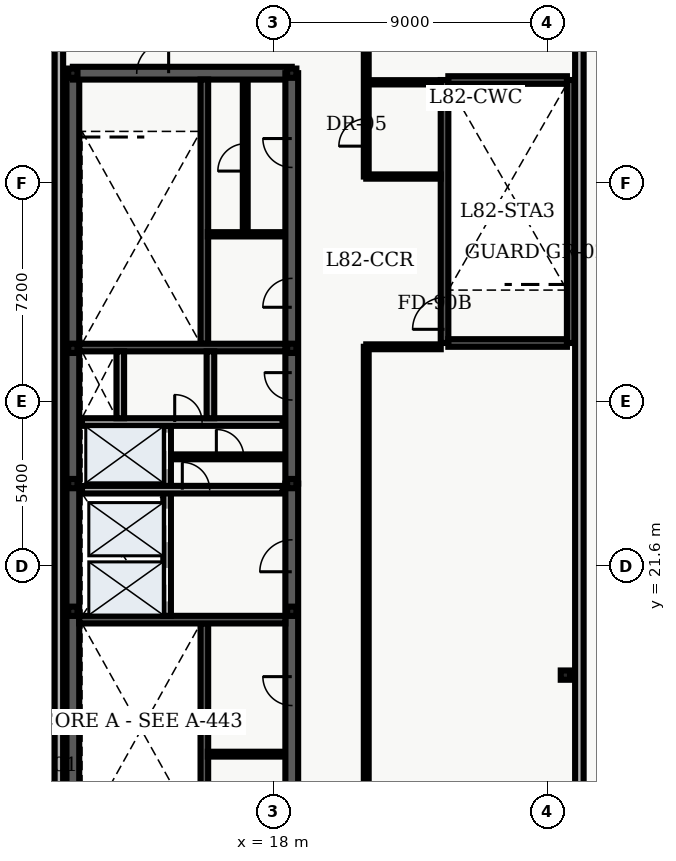
"""IFC4 building model, lengths in metres.
Left out: names, types, materials, properties, quantities, classifications, styles, units other than length and angle.
Written with IfcOpenShell. Run it as: python <this file> out.ifc"""

import sys

from ifc_helpers import new_model, entity, si_unit, converted_unit, direction, frame, origin_with_axes, origin_2d_with_axis, place, context, subcontext, project, spatial, polyline, rectangle, hollow_rectangle, outline, extrude, element, fill, save


model = new_model("IFC4")
c1 = context("Model", 3, precision=1e-05, world=origin_with_axes(), true_north=direction((0.0, 1.0)))
c2 = subcontext(c1, "Body", "Model", "MODEL_VIEW")
j1 = project(units=[si_unit("LENGTHUNIT", "METRE"), converted_unit("PLANEANGLEUNIT", "DEGREE", entity("IfcPlaneAngleMeasure", 0.017), si_unit("PLANEANGLEUNIT", "RADIAN"), dimensions=[0, 0, 0, 0, 0, 0, 0])], contexts=[c1])
p1 = place(None, origin_with_axes())
s1 = spatial("IfcSite", under=j1, at=p1, CompositionType="ELEMENT")
p2 = place(p1, origin_with_axes())
s2 = spatial("IfcBuilding", under=s1, at=p2, CompositionType="ELEMENT")
p3 = place(p2, frame((0.0, 0.0, 332.1), z_axis=(0.0, 0.0, 1.0), x_axis=(1.0, 0.0, 0.0)))
s3 = spatial("IfcBuildingStorey", under=s2, at=p3, CompositionType="ELEMENT", Elevation=332.1)
p4 = place(p3, frame((11.4, 10.8, 0.0), z_axis=(0.0, 0.0, 1.0), x_axis=(0.0, 1.0, 0.0)))
e1 = element("IfcWall", 1, at=p4, inside=s3, PredefinedType="SHEAR", context=c2, shape_type="SweptSolid", body=[
    extrude(outline(polyline([(0.0, -0.21), (27.0, -0.21), (27.0, 0.21), (0.0, 0.21), (0.0, -0.21)])), origin_with_axes(), (0.0, 0.0, 1.0), 3.64),
])
p5 = place(p3, frame((11.4, 37.8, 0.0), z_axis=(0.0, 0.0, 1.0), x_axis=(1.0, 0.0, 0.0)))
e2 = element("IfcWall", 2, at=p5, inside=s3, PredefinedType="SHEAR", context=c2, shape_type="SweptSolid", body=[
    extrude(outline(polyline([(0.0, -0.21), (7.2, -0.21), (7.2, 0.21), (0.0, 0.21), (0.0, -0.21)])), origin_with_axes(), (0.0, 0.0, 1.0), 3.64),
])
p6 = place(p5, frame((2.625, 0.0, 0.0), z_axis=(0.0, 0.0, 1.0), x_axis=(1.0, 0.0, 0.0)))
e3 = element("IfcOpeningElement", 3, at=p6, cuts=e2, PredefinedType="OPENING", context=c2, shape_type="SweptSolid", body=[
    extrude(rectangle(XDim=1.05, YDim=0.44, at=origin_2d_with_axis()), origin_with_axes(), (0.0, 0.0, 1.0), 2.15),
])
p7 = place(p3, frame((18.6, 10.8, 0.0), z_axis=(0.0, 0.0, 1.0), x_axis=(0.0, 1.0, 0.0)))
e4 = element("IfcWall", 4, at=p7, inside=s3, PredefinedType="SHEAR", context=c2, shape_type="SweptSolid", body=[
    extrude(outline(polyline([(0.0, -0.21), (13.5, -0.21), (13.5, 0.21), (0.0, 0.21), (0.0, -0.21)])), origin_with_axes(), (0.0, 0.0, 1.0), 3.64),
])
p8 = place(p7, frame((11.125, 0.0, 0.0), z_axis=(0.0, 0.0, 1.0), x_axis=(1.0, 0.0, 0.0)))
e5 = element("IfcOpeningElement", 5, at=p8, cuts=e4, PredefinedType="OPENING", context=c2, shape_type="SweptSolid", body=[
    extrude(rectangle(XDim=1.05, YDim=0.44, at=origin_2d_with_axis()), origin_with_axes(), (0.0, 0.0, 1.0), 2.15),
])
p9 = place(p7, frame((2.375, 0.0, 0.0), z_axis=(0.0, 0.0, 1.0), x_axis=(1.0, 0.0, 0.0)))
e6 = element("IfcOpeningElement", 6, at=p9, cuts=e4, PredefinedType="OPENING", context=c2, shape_type="SweptSolid", body=[
    extrude(rectangle(XDim=0.95, YDim=0.44, at=origin_2d_with_axis()), origin_with_axes(), (0.0, 0.0, 1.0), 2.15),
])
p10 = place(p7, frame((6.675, 0.0, 0.0), z_axis=(0.0, 0.0, 1.0), x_axis=(1.0, 0.0, 0.0)))
e7 = element("IfcOpeningElement", 7, at=p10, cuts=e4, PredefinedType="OPENING", context=c2, shape_type="SweptSolid", body=[
    extrude(rectangle(XDim=0.95, YDim=0.44, at=origin_2d_with_axis()), origin_with_axes(), (0.0, 0.0, 1.0), 2.15),
])
p11 = place(p3, frame((18.6, 24.3, 0.0), z_axis=(0.0, 0.0, 1.0), x_axis=(0.0, 1.0, 0.0)))
e8 = element("IfcWall", 8, at=p11, inside=s3, PredefinedType="SHEAR", context=c2, shape_type="SweptSolid", body=[
    extrude(outline(polyline([(0.0, -0.21), (13.5, -0.21), (13.5, 0.21), (0.0, 0.21), (0.0, -0.21)])), origin_with_axes(), (0.0, 0.0, 1.0), 3.64),
])
p12 = place(p11, frame((3.2, 0.0, 0.0), z_axis=(0.0, 0.0, 1.0), x_axis=(1.0, 0.0, 0.0)))
e9 = element("IfcOpeningElement", 9, at=p12, cuts=e8, PredefinedType="OPENING", context=c2, shape_type="SweptSolid", body=[
    extrude(rectangle(XDim=0.9, YDim=0.44, at=origin_2d_with_axis()), origin_with_axes(), (0.0, 0.0, 1.0), 2.15),
])
p13 = place(p11, frame((6.275, 0.0, 0.0), z_axis=(0.0, 0.0, 1.0), x_axis=(1.0, 0.0, 0.0)))
e10 = element("IfcOpeningElement", 10, at=p13, cuts=e8, PredefinedType="OPENING", context=c2, shape_type="SweptSolid", body=[
    extrude(rectangle(XDim=0.95, YDim=0.44, at=origin_2d_with_axis()), origin_with_axes(), (0.0, 0.0, 1.0), 2.15),
])
p14 = place(p11, frame((10.875, 0.0, 0.0), z_axis=(0.0, 0.0, 1.0), x_axis=(1.0, 0.0, 0.0)))
e11 = element("IfcOpeningElement", 11, at=p14, cuts=e8, PredefinedType="OPENING", context=c2, shape_type="SweptSolid", body=[
    extrude(rectangle(XDim=0.95, YDim=0.44, at=origin_2d_with_axis()), origin_with_axes(), (0.0, 0.0, 1.0), 2.15),
])
p15 = place(p3, frame((15.725, 11.01, 0.0), z_axis=(0.0, 0.0, 1.0), x_axis=(0.0, 1.0, 0.0)))
e12 = element("IfcWall", 12, at=p15, inside=s3, PredefinedType="SHEAR", context=c2, shape_type="SweptSolid", body=[
    extrude(outline(polyline([(0.0, -0.125), (8.69, -0.125), (8.69, 0.125), (0.0, 0.125), (0.0, -0.125)])), origin_with_axes(), (0.0, 0.0, 1.0), 3.64),
])
p16 = place(p3, frame((11.61, 19.825, 0.0), z_axis=(0.0, 0.0, 1.0), x_axis=(1.0, 0.0, 0.0)))
e13 = element("IfcWall", 13, at=p16, inside=s3, PredefinedType="SHEAR", context=c2, shape_type="SweptSolid", body=[
    extrude(outline(polyline([(0.0, -0.125), (6.78, -0.125), (6.78, 0.125), (0.0, 0.125), (0.0, -0.125)])), origin_with_axes(), (0.0, 0.0, 1.0), 3.64),
])
p17 = place(p3, frame((15.725, 28.9, 0.0), z_axis=(0.0, 0.0, 1.0), x_axis=(0.0, 1.0, 0.0)))
e14 = element("IfcWall", 14, at=p17, inside=s3, PredefinedType="SHEAR", context=c2, shape_type="SweptSolid", body=[
    extrude(outline(polyline([(0.0, -0.125), (8.69, -0.125), (8.69, 0.125), (0.0, 0.125), (0.0, -0.125)])), origin_with_axes(), (0.0, 0.0, 1.0), 3.64),
])
p18 = place(p3, frame((11.61, 28.775, 0.0), z_axis=(0.0, 0.0, 1.0), x_axis=(1.0, 0.0, 0.0)))
e15 = element("IfcWall", 15, at=p18, inside=s3, PredefinedType="SHEAR", context=c2, shape_type="SweptSolid", body=[
    extrude(outline(polyline([(0.0, -0.125), (6.78, -0.125), (6.78, 0.125), (0.0, 0.125), (0.0, -0.125)])), origin_with_axes(), (0.0, 0.0, 1.0), 3.64),
])
p19 = place(p3, frame((14.5, 19.95, 0.0), z_axis=(0.0, 0.0, 1.0), x_axis=(0.0, 1.0, 0.0)))
e16 = element("IfcWall", 16, at=p19, inside=s3, PredefinedType="SOLIDWALL", context=c2, shape_type="SweptSolid", body=[
    extrude(outline(polyline([(0.0, -0.125), (6.25, -0.125), (6.25, 0.125), (0.0, 0.125), (0.0, -0.125)])), origin_with_axes(), (0.0, 0.0, 1.0), 2.68),
])
p20 = place(p19, frame((1.025, 0.0, 0.0), z_axis=(0.0, 0.0, 1.0), x_axis=(1.0, 0.0, 0.0)))
e17 = element("IfcOpeningElement", 17, at=p20, cuts=e16, PredefinedType="OPENING", context=c2, shape_type="SweptSolid", body=[
    extrude(rectangle(XDim=1.1, YDim=0.27, at=origin_2d_with_axis()), origin_with_axes(), (0.0, 0.0, 1.0), 2.15),
])
p21 = place(p19, frame((2.975, 0.0, 0.0), z_axis=(0.0, 0.0, 1.0), x_axis=(1.0, 0.0, 0.0)))
e18 = element("IfcOpeningElement", 18, at=p21, cuts=e16, PredefinedType="OPENING", context=c2, shape_type="SweptSolid", body=[
    extrude(rectangle(XDim=1.1, YDim=0.27, at=origin_2d_with_axis()), origin_with_axes(), (0.0, 0.0, 1.0), 2.15),
])
p22 = place(p19, frame((5.425, 0.0, 0.0), z_axis=(0.0, 0.0, 1.0), x_axis=(1.0, 0.0, 0.0)))
e19 = element("IfcOpeningElement", 19, at=p22, cuts=e16, PredefinedType="OPENING", context=c2, shape_type="SweptSolid", body=[
    extrude(rectangle(XDim=1.2, YDim=0.27, at=origin_2d_with_axis()), origin_with_axes(), (0.0, 0.0, 1.0), 2.15),
])
p23 = place(p3, frame((11.7, 24.1, 0.0), z_axis=(0.0, 0.0, 1.0), x_axis=(1.0, 0.0, 0.0)))
e20 = element("IfcWall", 20, at=p23, inside=s3, PredefinedType="SOLIDWALL", context=c2, shape_type="SweptSolid", body=[
    extrude(outline(polyline([(0.0, -0.125), (6.6, -0.125), (6.6, 0.125), (0.0, 0.125), (0.0, -0.125)])), origin_with_axes(), (0.0, 0.0, 1.0), 2.68),
])
p24 = place(p23, frame((3.75, 0.0, 0.0), z_axis=(0.0, 0.0, 1.0), x_axis=(1.0, 0.0, 0.0)))
e21 = element("IfcOpeningElement", 21, at=p24, cuts=e20, PredefinedType="OPENING", context=c2, shape_type="SweptSolid", body=[
    extrude(rectangle(XDim=0.9, YDim=0.27, at=origin_2d_with_axis()), origin_with_axes(), (0.0, 0.0, 1.0), 2.15),
])
p25 = place(p3, frame((11.7, 26.325, 0.0), z_axis=(0.0, 0.0, 1.0), x_axis=(1.0, 0.0, 0.0)))
e22 = element("IfcWall", 22, at=p25, inside=s3, PredefinedType="SOLIDWALL", context=c2, shape_type="SweptSolid", body=[
    extrude(outline(polyline([(0.0, -0.125), (6.6, -0.125), (6.6, 0.125), (0.0, 0.125), (0.0, -0.125)])), origin_with_axes(), (0.0, 0.0, 1.0), 2.68),
])
p26 = place(p25, frame((3.5, 0.0, 0.0), z_axis=(0.0, 0.0, 1.0), x_axis=(1.0, 0.0, 0.0)))
e23 = element("IfcOpeningElement", 23, at=p26, cuts=e22, PredefinedType="OPENING", context=c2, shape_type="SweptSolid", body=[
    extrude(rectangle(XDim=0.9, YDim=0.27, at=origin_2d_with_axis()), origin_with_axes(), (0.0, 0.0, 1.0), 2.15),
])
for number, where, z_axis, x_axis in (
    (24, (12.96, 26.45, 0.0), (0.0, 0.0, 1.0), (0.0, 1.0, 0.0)),
    (25, (15.925, 26.45, 0.0), (0.0, 0.0, 1.0), (0.0, 1.0, 0.0)),
):
    element("IfcWall", number, at=place(p3, frame(where, z_axis=z_axis, x_axis=x_axis)), inside=s3, PredefinedType="SOLIDWALL", context=c2, shape_type="SweptSolid", body=[
        extrude(outline(polyline([(0.0, -0.125), (2.2, -0.125), (2.2, 0.125), (0.0, 0.125), (0.0, -0.125)])), origin_with_axes(), (0.0, 0.0, 1.0), 2.68),
    ])
p27 = place(p3, frame((23.625, 28.925, 0.0), z_axis=(0.0, 0.0, 1.0), x_axis=(0.0, 1.0, 0.0)))
e26 = element("IfcWall", 26, at=p27, inside=s3, PredefinedType="SHEAR", context=c2, shape_type="SweptSolid", body=[
    extrude(outline(polyline([(0.0, -0.125), (8.65, -0.125), (8.65, 0.125), (0.0, 0.125), (0.0, -0.125)])), origin_with_axes(), (0.0, 0.0, 1.0), 3.64),
])
p28 = place(p27, frame((0.975, 0.0, 0.0), z_axis=(0.0, 0.0, 1.0), x_axis=(1.0, 0.0, 0.0)))
e27 = element("IfcOpeningElement", 27, at=p28, cuts=e26, PredefinedType="OPENING", context=c2, shape_type="SweptSolid", body=[
    extrude(rectangle(XDim=1.05, YDim=0.27, at=origin_2d_with_axis()), origin_with_axes(), (0.0, 0.0, 1.0), 2.15),
])
p29 = place(p3, frame((27.775, 28.925, 0.0), z_axis=(0.0, 0.0, 1.0), x_axis=(0.0, 1.0, 0.0)))
e28 = element("IfcWall", 28, at=p29, inside=s3, PredefinedType="SHEAR", context=c2, shape_type="SweptSolid", body=[
    extrude(outline(polyline([(0.0, -0.125), (8.65, -0.125), (8.65, 0.125), (0.0, 0.125), (0.0, -0.125)])), origin_with_axes(), (0.0, 0.0, 1.0), 3.64),
])
for number, where, z_axis, x_axis in (
    (29, (23.75, 28.925, 0.0), (0.0, 0.0, 1.0), (1.0, 0.0, 0.0)),
    (30, (23.75, 37.575, 0.0), (0.0, 0.0, 1.0), (1.0, 0.0, 0.0)),
):
    element("IfcWall", number, at=place(p3, frame(where, z_axis=z_axis, x_axis=x_axis)), inside=s3, PredefinedType="SHEAR", context=c2, shape_type="SweptSolid", body=[
        extrude(outline(polyline([(0.0, -0.125), (3.9, -0.125), (3.9, 0.125), (0.0, 0.125), (0.0, -0.125)])), origin_with_axes(), (0.0, 0.0, 1.0), 3.64),
    ])
for number, where, z_axis, x_axis in (
    (31, (11.4, 20.1, 0.0), (0.0, 0.0, 1.0), (1.0, 0.0, 0.0)),
    (32, (11.4, 24.3, 0.0), (0.0, 0.0, 1.0), (1.0, 0.0, 0.0)),
    (33, (11.4, 28.75, 0.0), (0.0, 0.0, 1.0), (1.0, 0.0, 0.0)),
    (34, (11.4, 37.8, 0.0), (0.0, 0.0, 1.0), (1.0, 0.0, 0.0)),
    (35, (18.6, 20.1, 0.0), (0.0, 0.0, 1.0), (1.0, 0.0, 0.0)),
    (36, (18.6, 24.3, 0.0), (0.0, 0.0, 1.0), (1.0, 0.0, 0.0)),
    (37, (18.6, 28.75, 0.0), (0.0, 0.0, 1.0), (1.0, 0.0, 0.0)),
    (38, (18.6, 37.8, 0.0), (0.0, 0.0, 1.0), (1.0, 0.0, 0.0)),
    (39, (27.6, 18.0, 0.0), (0.0, 0.0, 1.0), (1.0, 0.0, 0.0)),
):
    element("IfcColumn", number, at=place(p3, frame(where, z_axis=z_axis, x_axis=x_axis)), inside=s3, PredefinedType="COLUMN", context=c2, shape_type="SweptSolid", body=[
        extrude(hollow_rectangle(XDim=0.305, YDim=0.305, WallThickness=0.015, InnerFilletRadius=0.015, OuterFilletRadius=0.03, at=origin_2d_with_axis()), origin_with_axes(), (0.0, 0.0, 1.0), 3.783),
    ])
p30 = place(p3, frame((14.62, 25.18, 0.0), z_axis=(0.0, 0.0, 1.0), x_axis=(1.0, 0.0, 0.0)))
e40 = element("IfcWall", 40, at=p30, inside=s3, PredefinedType="PARTITIONING", context=c2, shape_type="SweptSolid", body=[
    extrude(outline(polyline([(0.0, -0.08), (3.68, -0.08), (3.68, 0.08), (0.0, 0.08), (0.0, -0.08)])), origin_with_axes(), (0.0, 0.0, 1.0), 2.68),
])
p31 = place(p30, frame((1.95, 0.0, 0.0), z_axis=(0.0, 0.0, 1.0), x_axis=(1.0, 0.0, 0.0)))
e41 = element("IfcOpeningElement", 41, at=p31, cuts=e40, PredefinedType="OPENING", context=c2, shape_type="SweptSolid", body=[
    extrude(rectangle(XDim=0.9, YDim=0.18, at=origin_2d_with_axis()), origin_with_axes(), (0.0, 0.0, 1.0), 2.15),
])
p32 = place(p3, frame((15.84, 15.4, 0.0), z_axis=(0.0, 0.0, 1.0), x_axis=(1.0, 0.0, 0.0)))
e42 = element("IfcWall", 42, at=p32, inside=s3, PredefinedType="PARTITIONING", context=c2, shape_type="SweptSolid", body=[
    extrude(outline(polyline([(0.0, -0.08), (2.46, -0.08), (2.46, 0.08), (0.0, 0.08), (0.0, -0.08)])), origin_with_axes(), (0.0, 0.0, 1.0), 2.68),
])
p33 = place(p3, frame((15.84, 32.5, 0.0), z_axis=(0.0, 0.0, 1.0), x_axis=(1.0, 0.0, 0.0)))
e43 = element("IfcWall", 43, at=p33, inside=s3, PredefinedType="PARTITIONING", context=c2, shape_type="SweptSolid", body=[
    extrude(outline(polyline([(0.0, -0.07), (2.46, -0.07), (2.46, 0.07), (0.0, 0.07), (0.0, -0.07)])), origin_with_axes(), (0.0, 0.0, 1.0), 2.68),
])
p34 = place(p3, frame((17.07, 32.58, 0.0), z_axis=(0.0, 0.0, 1.0), x_axis=(0.0, 1.0, 0.0)))
e44 = element("IfcWall", 44, at=p34, inside=s3, PredefinedType="PARTITIONING", context=c2, shape_type="SweptSolid", body=[
    extrude(outline(polyline([(0.0, -0.08), (4.92, -0.08), (4.92, 0.08), (0.0, 0.08), (0.0, -0.08)])), origin_with_axes(), (0.0, 0.0, 1.0), 2.68),
])
p35 = place(p34, frame((2.45, 0.0, 0.0), z_axis=(0.0, 0.0, 1.0), x_axis=(1.0, 0.0, 0.0)))
e45 = element("IfcOpeningElement", 45, at=p35, cuts=e44, PredefinedType="OPENING", context=c2, shape_type="SweptSolid", body=[
    extrude(rectangle(XDim=0.9, YDim=0.18, at=origin_2d_with_axis()), origin_with_axes(), (0.0, 0.0, 1.0), 2.15),
])
for number, where, z_axis, x_axis in (
    (46, (21.05, 34.4, 0.0), (0.0, 0.0, 1.0), (1.0, 0.0, 0.0)),
    (47, (21.05, 37.5, 0.0), (0.0, 0.0, 1.0), (1.0, 0.0, 0.0)),
):
    element("IfcWall", number, at=place(p3, frame(where, z_axis=z_axis, x_axis=x_axis)), inside=s3, PredefinedType="PARTITIONING", context=c2, shape_type="SweptSolid", body=[
        extrude(outline(polyline([(0.0, -0.07), (2.45, -0.07), (2.45, 0.07), (0.0, 0.07), (0.0, -0.07)])), origin_with_axes(), (0.0, 0.0, 1.0), 2.68),
    ])
p36 = place(p3, frame((21.05, 7.495, 0.0), z_axis=(0.0, 0.0, 1.0), x_axis=(0.0, 1.0, 0.0)))
e48 = element("IfcWall", 48, at=p36, inside=s3, PredefinedType="PARTITIONING", context=c2, shape_type="SweptSolid", body=[
    extrude(outline(polyline([(0.0, -0.08), (21.305, -0.08), (21.305, 0.08), (0.0, 0.08), (0.0, -0.08)])), origin_with_axes(), (0.0, 0.0, 1.0), 2.68),
])
p37 = place(p36, frame((4.78, 0.0, 0.0), z_axis=(0.0, 0.0, 1.0), x_axis=(1.0, 0.0, 0.0)))
e49 = element("IfcOpeningElement", 49, at=p37, cuts=e48, PredefinedType="OPENING", context=c2, shape_type="SweptSolid", body=[
    extrude(rectangle(XDim=1.05, YDim=0.18, at=origin_2d_with_axis()), origin_with_axes(), (0.0, 0.0, 1.0), 2.15),
])
p38 = place(p3, frame((21.05, 34.4, 0.0), z_axis=(0.0, 0.0, 1.0), x_axis=(0.0, 1.0, 0.0)))
e50 = element("IfcWall", 50, at=p38, inside=s3, PredefinedType="PARTITIONING", context=c2, shape_type="SweptSolid", body=[
    extrude(outline(polyline([(0.0, -0.08), (6.705, -0.08), (6.705, 0.08), (0.0, 0.08), (0.0, -0.08)])), origin_with_axes(), (0.0, 0.0, 1.0), 2.68),
])
p39 = place(p38, frame((1.45, 0.0, 0.0), z_axis=(0.0, 0.0, 1.0), x_axis=(1.0, 0.0, 0.0)))
e51 = element("IfcOpeningElement", 51, at=p39, cuts=e50, PredefinedType="OPENING", context=c2, shape_type="SweptSolid", body=[
    extrude(rectangle(XDim=0.9, YDim=0.18, at=origin_2d_with_axis()), origin_with_axes(), (0.0, 0.0, 1.0), 2.15),
])
p40 = place(p3, frame((21.05, 28.8, 0.0), z_axis=(0.0, 0.0, 1.0), x_axis=(1.0, 0.0, 0.0)))
e52 = element("IfcWall", 52, at=p40, inside=s3, PredefinedType="PARTITIONING", context=c2, shape_type="SweptSolid", body=[
    extrude(outline(polyline([(0.0, -0.08), (2.45, -0.08), (2.45, 0.08), (0.0, 0.08), (0.0, -0.08)])), origin_with_axes(), (0.0, 0.0, 1.0), 2.68),
])
p41 = place(p3, frame((10.75, 7.5, 0.0), z_axis=(0.0, 0.0, 1.0), x_axis=(0.0, 1.0, 0.0)))
e53 = element("IfcWall", 53, at=p41, inside=s3, PredefinedType="SOLIDWALL", context=c2, shape_type="SweptSolid", body=[
    extrude(outline(polyline([(0.0, -0.15), (33.9, -0.15), (33.9, 0.15), (0.0, 0.15), (0.0, -0.15)])), origin_with_axes(), (0.0, 0.0, 1.0), 3.64),
])
for number, where, z_axis, x_axis in (
    (54, (28.06, 39.6, 3.9), (0.0, 0.0, 1.0), (0.0, -1.0, 0.0)),
    (55, (10.94, 9.0, 3.9), (0.0, 0.0, 1.0), (0.0, 1.0, 0.0)),
):
    element("IfcWall", number, at=place(p3, frame(where, z_axis=z_axis, x_axis=x_axis)), inside=s3, PredefinedType="PARAPET", context=c2, shape_type="SweptSolid", body=[
        extrude(outline(polyline([(0.0, -0.14), (30.6, -0.14), (30.6, 0.14), (0.0, 0.14), (0.0, -0.14)])), origin_with_axes(), (0.0, 0.0, 1.0), 1.2),
    ])
p42 = place(p19, frame((1.025, 0.0, 0.0), z_axis=(0.0, 0.0, 1.0), x_axis=(1.0, 0.0, 0.0)))
e56 = element("IfcDoor", 56, at=p42, inside=s3, OperationType="SLIDING_TO_LEFT", PredefinedType="DOOR", context=c2, shape_type="SweptSolid", body=[
    extrude(rectangle(XDim=1.1, YDim=0.09, at=origin_2d_with_axis()), origin_with_axes(), (0.0, 0.0, 1.0), 2.15),
])
fill(e17, e56)
p43 = place(p19, frame((2.975, 0.0, 0.0), z_axis=(0.0, 0.0, 1.0), x_axis=(1.0, 0.0, 0.0)))
e57 = element("IfcDoor", 57, at=p43, inside=s3, OperationType="SLIDING_TO_RIGHT", PredefinedType="DOOR", context=c2, shape_type="SweptSolid", body=[
    extrude(rectangle(XDim=1.1, YDim=0.09, at=origin_2d_with_axis()), origin_with_axes(), (0.0, 0.0, 1.0), 2.15),
])
fill(e18, e57)
p44 = place(p19, frame((5.425, 0.0, 0.0), z_axis=(0.0, 0.0, 1.0), x_axis=(1.0, 0.0, 0.0)))
e58 = element("IfcDoor", 58, at=p44, inside=s3, OperationType="DOUBLE_DOOR_SLIDING", PredefinedType="DOOR", context=c2, shape_type="SweptSolid", body=[
    extrude(rectangle(XDim=1.2, YDim=0.09, at=origin_2d_with_axis()), origin_with_axes(), (0.0, 0.0, 1.0), 2.15),
])
fill(e19, e58)
p45 = place(p11, frame((3.2, 0.0, 0.0), z_axis=(0.0, 0.0, 1.0), x_axis=(1.0, 0.0, 0.0)))
e59 = element("IfcDoor", 59, at=p45, inside=s3, OperationType="SINGLE_SWING_RIGHT", PredefinedType="DOOR", context=c2, shape_type="SweptSolid", body=[
    extrude(rectangle(XDim=0.9, YDim=0.09, at=origin_2d_with_axis()), origin_with_axes(), (0.0, 0.0, 1.0), 2.15),
])
fill(e9, e59)
p46 = place(p5, frame((2.625, 0.0, 0.0), z_axis=(0.0, 0.0, 1.0), x_axis=(1.0, 0.0, 0.0)))
e60 = element("IfcDoor", 60, at=p46, inside=s3, OperationType="SINGLE_SWING_RIGHT", PredefinedType="DOOR", context=c2, shape_type="SweptSolid", body=[
    extrude(rectangle(XDim=1.05, YDim=0.09, at=origin_2d_with_axis()), origin_with_axes(), (0.0, 0.0, 1.0), 2.15),
])
fill(e3, e60)
p47 = place(p7, frame((11.125, 0.0, 0.0), z_axis=(0.0, 0.0, 1.0), x_axis=(1.0, 0.0, 0.0)))
e61 = element("IfcDoor", 61, at=p47, inside=s3, OperationType="SINGLE_SWING_LEFT", PredefinedType="DOOR", context=c2, shape_type="SweptSolid", body=[
    extrude(rectangle(XDim=1.05, YDim=0.09, at=origin_2d_with_axis()), origin_with_axes(), (0.0, 0.0, 1.0), 2.15),
])
fill(e5, e61)
p48 = place(p25, frame((3.5, 0.0, 0.0), z_axis=(0.0, 0.0, 1.0), x_axis=(1.0, 0.0, 0.0)))
e62 = element("IfcDoor", 62, at=p48, inside=s3, OperationType="SINGLE_SWING_LEFT", PredefinedType="DOOR", context=c2, shape_type="SweptSolid", body=[
    extrude(rectangle(XDim=0.9, YDim=0.09, at=origin_2d_with_axis()), origin_with_axes(), (0.0, 0.0, 1.0), 2.15),
])
fill(e23, e62)
p49 = place(p23, frame((3.75, 0.0, 0.0), z_axis=(0.0, 0.0, 1.0), x_axis=(1.0, 0.0, 0.0)))
e63 = element("IfcDoor", 63, at=p49, inside=s3, OperationType="SINGLE_SWING_LEFT", PredefinedType="DOOR", context=c2, shape_type="SweptSolid", body=[
    extrude(rectangle(XDim=0.9, YDim=0.09, at=origin_2d_with_axis()), origin_with_axes(), (0.0, 0.0, 1.0), 2.15),
])
fill(e21, e63)
p50 = place(p30, frame((1.95, 0.0, 0.0), z_axis=(0.0, 0.0, 1.0), x_axis=(1.0, 0.0, 0.0)))
e64 = element("IfcDoor", 64, at=p50, inside=s3, OperationType="SINGLE_SWING_LEFT", PredefinedType="DOOR", context=c2, shape_type="SweptSolid", body=[
    extrude(rectangle(XDim=0.9, YDim=0.09, at=origin_2d_with_axis()), origin_with_axes(), (0.0, 0.0, 1.0), 2.15),
])
fill(e41, e64)
p51 = place(p7, frame((6.675, 0.0, 0.0), z_axis=(0.0, 0.0, 1.0), x_axis=(1.0, 0.0, 0.0)))
e65 = element("IfcDoor", 65, at=p51, inside=s3, OperationType="SINGLE_SWING_RIGHT", PredefinedType="DOOR", context=c2, shape_type="SweptSolid", body=[
    extrude(rectangle(XDim=0.95, YDim=0.09, at=origin_2d_with_axis()), origin_with_axes(), (0.0, 0.0, 1.0), 2.15),
])
fill(e7, e65)
p52 = place(p11, frame((6.275, 0.0, 0.0), z_axis=(0.0, 0.0, 1.0), x_axis=(1.0, 0.0, 0.0)))
e66 = element("IfcDoor", 66, at=p52, inside=s3, OperationType="SINGLE_SWING_LEFT", PredefinedType="DOOR", context=c2, shape_type="SweptSolid", body=[
    extrude(rectangle(XDim=0.95, YDim=0.09, at=origin_2d_with_axis()), origin_with_axes(), (0.0, 0.0, 1.0), 2.15),
])
fill(e10, e66)
p53 = place(p34, frame((2.45, 0.0, 0.0), z_axis=(0.0, 0.0, 1.0), x_axis=(1.0, 0.0, 0.0)))
e67 = element("IfcDoor", 67, at=p53, inside=s3, OperationType="SINGLE_SWING_LEFT", PredefinedType="DOOR", context=c2, shape_type="SweptSolid", body=[
    extrude(rectangle(XDim=0.9, YDim=0.09, at=origin_2d_with_axis()), origin_with_axes(), (0.0, 0.0, 1.0), 2.15),
])
fill(e45, e67)
p54 = place(p11, frame((10.875, 0.0, 0.0), z_axis=(0.0, 0.0, 1.0), x_axis=(1.0, 0.0, 0.0)))
e68 = element("IfcDoor", 68, at=p54, inside=s3, OperationType="SINGLE_SWING_RIGHT", PredefinedType="DOOR", context=c2, shape_type="SweptSolid", body=[
    extrude(rectangle(XDim=0.95, YDim=0.09, at=origin_2d_with_axis()), origin_with_axes(), (0.0, 0.0, 1.0), 2.15),
])
fill(e11, e68)
p55 = place(p27, frame((0.975, 0.0, 0.0), z_axis=(0.0, 0.0, 1.0), x_axis=(1.0, 0.0, 0.0)))
e69 = element("IfcDoor", 69, at=p55, inside=s3, OperationType="SINGLE_SWING_LEFT", PredefinedType="DOOR", context=c2, shape_type="SweptSolid", body=[
    extrude(rectangle(XDim=1.05, YDim=0.09, at=origin_2d_with_axis()), origin_with_axes(), (0.0, 0.0, 1.0), 2.15),
])
fill(e27, e69)
p56 = place(p38, frame((1.45, 0.0, 0.0), z_axis=(0.0, 0.0, 1.0), x_axis=(1.0, 0.0, 0.0)))
e70 = element("IfcDoor", 70, at=p56, inside=s3, OperationType="SINGLE_SWING_LEFT", PredefinedType="DOOR", context=c2, shape_type="SweptSolid", body=[
    extrude(rectangle(XDim=0.9, YDim=0.09, at=origin_2d_with_axis()), origin_with_axes(), (0.0, 0.0, 1.0), 2.15),
])
fill(e51, e70)
save(model, sys.argv[1])
